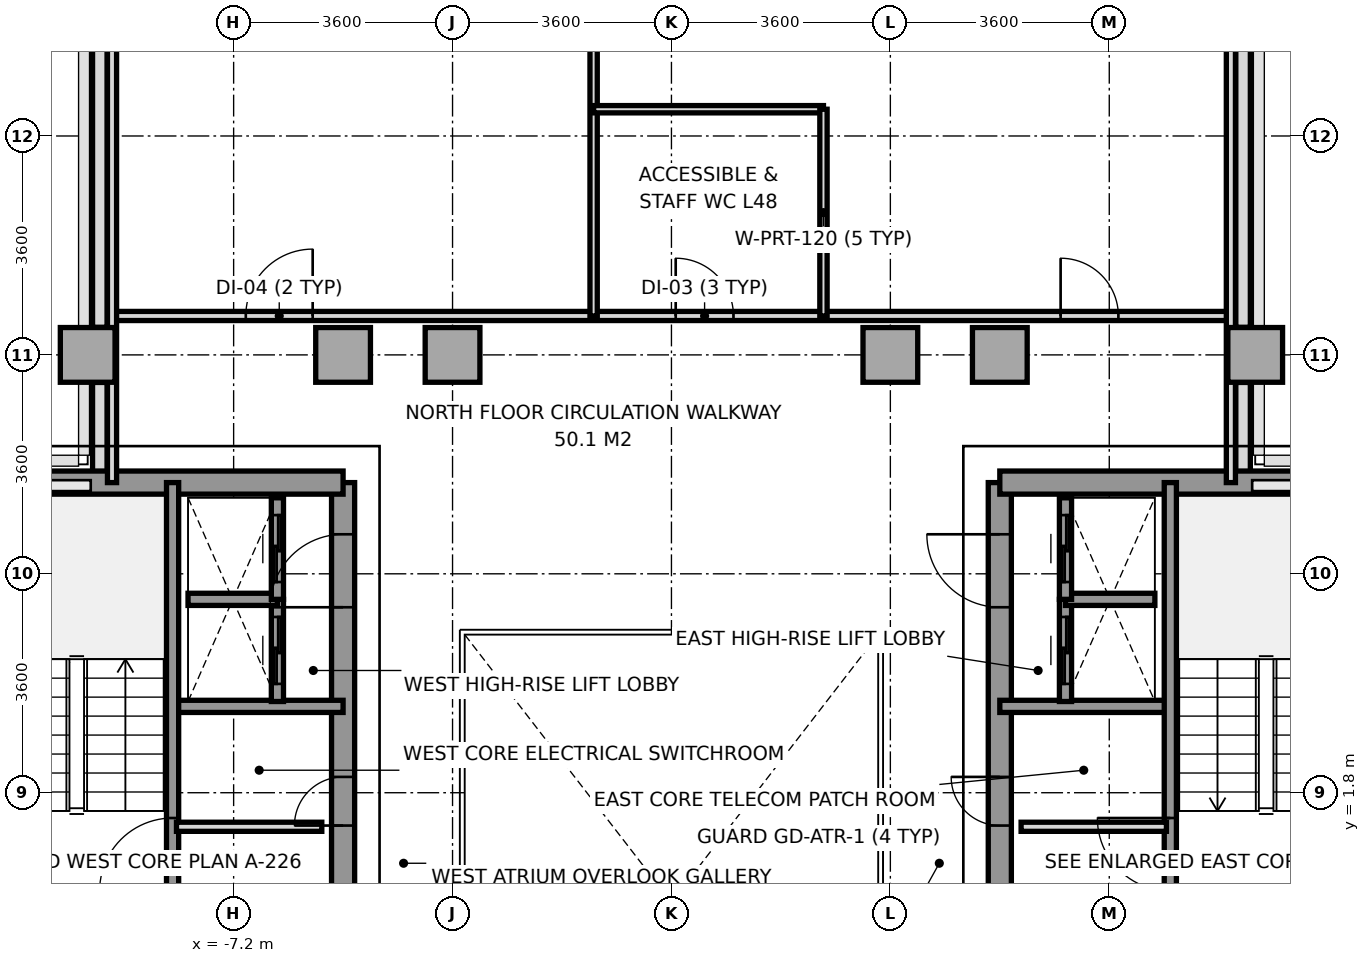
"""IFC4 building model, lengths in metres.
Left out: names, types, materials, properties, quantities, classifications, styles, units other than length and angle.
Written with IfcOpenShell. Run it as: python <this file> out.ifc"""

import sys

from ifc_helpers import new_model, si_unit, direction, frame, frame_2d, origin, origin_2d, place, context, subcontext, project, spatial, rectangle, extrude, source, transform, mapped, element, fill, save


model = new_model("IFC4")
c1 = context("Model", 3, precision=1e-05, world=origin(), true_north=direction((0.0, 1.0)))
c2 = subcontext(c1, "Body", "Model", "MODEL_VIEW")
j1 = project(units=[si_unit("LENGTHUNIT", "METRE"), si_unit("PLANEANGLEUNIT", "RADIAN")], contexts=[c1])
p1 = place(None, origin())
s1 = spatial("IfcSite", under=j1, at=p1, CompositionType="ELEMENT")
p2 = place(p1, origin())
s2 = spatial("IfcBuilding", under=s1, at=p2, CompositionType="ELEMENT")
p3 = place(p2, frame((0.0, 0.0, 177.4)))
s3 = spatial("IfcBuildingStorey", under=s2, at=p3, CompositionType="ELEMENT", Elevation=177.4)
m1 = source(origin(), c2, "Body", "SweptSolid", [
    extrude(rectangle(XDim=0.9, YDim=0.9, at=origin_2d()), origin(), (0.0, 0.0, 1.0), 3.2),
])
for number, where, z_axis, x_axis in (
    (1, (-9.6, 9.0, 0.0), (0.0, 0.0, 1.0), (1.0, 0.0, 0.0)),
    (2, (-5.4, 9.0, 0.0), (0.0, 0.0, 1.0), (1.0, 0.0, 0.0)),
    (3, (-3.6, 9.0, 0.0), (0.0, 0.0, 1.0), (1.0, 0.0, 0.0)),
    (4, (3.6, 9.0, 0.0), (0.0, 0.0, 1.0), (1.0, 0.0, 0.0)),
    (5, (5.4, 9.0, 0.0), (0.0, 0.0, 1.0), (1.0, 0.0, 0.0)),
    (6, (9.6, 9.0, 0.0), (0.0, 0.0, 1.0), (1.0, 0.0, 0.0)),
):
    element("IfcColumn", number, at=place(p3, frame(where, z_axis=z_axis, x_axis=x_axis)), inside=s3, PredefinedType="COLUMN", context=c2, shape_type="MappedRepresentation", body=[
        mapped(m1, transform((0.0, 0.0, 0.0), x_axis=(1.0, 0.0, 0.0), y_axis=(0.0, 1.0, 0.0), z_axis=(0.0, 0.0, 1.0), scale=1.0)),
    ])
p4 = place(p3, frame((-9.4, 6.953, 0.0), z_axis=(0.0, 0.0, 1.0), x_axis=(0.0, 1.0, 0.0)))
e7 = element("IfcWall", 7, at=p4, inside=s3, PredefinedType="PARAPET", context=c2, shape_type="SweptSolid", body=[
    extrude(rectangle(XDim=1.594, YDim=0.24, at=frame_2d((0.797, 0.0))), origin(), (0.0, 0.0, 1.0), 1.15),
])
p5 = place(p3, frame((-9.4, 9.453, 0.0), z_axis=(0.0, 0.0, 1.0), x_axis=(0.0, 1.0, 0.0)))
e8 = element("IfcWall", 8, at=p5, inside=s3, PredefinedType="PARAPET", context=c2, shape_type="SweptSolid", body=[
    extrude(rectangle(XDim=6.15, YDim=0.24, at=frame_2d((3.075, 0.0))), origin(), (0.0, 0.0, 1.0), 1.15),
])
p6 = place(p3, frame((9.4, 15.358, 0.0), z_axis=(0.0, 0.0, 1.0), x_axis=(0.0, -1.0, 0.0)))
e9 = element("IfcWall", 9, at=p6, inside=s3, PredefinedType="PARAPET", context=c2, shape_type="SweptSolid", body=[
    extrude(rectangle(XDim=5.905, YDim=0.24, at=frame_2d((2.952, 0.0))), origin(), (0.0, 0.0, 1.0), 1.15),
])
p7 = place(p3, frame((9.4, 8.547, 0.0), z_axis=(0.0, 0.0, 1.0), x_axis=(0.0, -1.0, 0.0)))
e10 = element("IfcWall", 10, at=p7, inside=s3, PredefinedType="PARAPET", context=c2, shape_type="SweptSolid", body=[
    extrude(rectangle(XDim=1.594, YDim=0.24, at=frame_2d((0.797, 0.0))), origin(), (0.0, 0.0, 1.0), 1.15),
])
p8 = place(p3, frame((-5.4, -5.6, 0.0), z_axis=(0.0, 0.0, 1.0), x_axis=(0.0, 1.0, 0.0)))
e11 = element("IfcWall", 11, at=p8, inside=s3, PredefinedType="SHEAR", context=c2, shape_type="SweptSolid", body=[
    extrude(rectangle(XDim=12.5, YDim=0.38, at=frame_2d((6.25, 0.0))), origin(), (0.0, 0.0, 1.0), 3.2),
])
p9 = place(p8, frame((4.55, 0.0, 0.0)))
e12 = element("IfcOpeningElement", 12, at=p9, cuts=e11, PredefinedType="OPENING", context=c2, shape_type="SweptSolid", body=[
    extrude(rectangle(XDim=1.2, YDim=2.2, at=frame_2d((0.6, 1.1))), frame((0.0, 0.2, 0.0), z_axis=(0.0, -1.0, 0.0), x_axis=(1.0, 0.0, 0.0)), (0.0, 0.0, 1.0), 0.4),
])
p10 = place(p8, frame((10.45, 0.0, 0.0)))
e13 = element("IfcOpeningElement", 13, at=p10, cuts=e11, PredefinedType="OPENING", context=c2, shape_type="SweptSolid", body=[
    extrude(rectangle(XDim=1.2, YDim=2.2, at=frame_2d((0.6, 1.1))), frame((0.0, 0.2, 0.0), z_axis=(0.0, -1.0, 0.0), x_axis=(1.0, 0.0, 0.0)), (0.0, 0.0, 1.0), 0.4),
])
p11 = place(p8, frame((6.86, 0.0, 0.0)))
e14 = element("IfcOpeningElement", 14, at=p11, cuts=e11, PredefinedType="OPENING", context=c2, shape_type="SweptSolid", body=[
    extrude(rectangle(XDim=0.8, YDim=2.1, at=frame_2d((0.4, 1.05))), frame((0.0, 0.2, 0.0), z_axis=(0.0, -1.0, 0.0), x_axis=(1.0, 0.0, 0.0)), (0.0, 0.0, 1.0), 0.4),
])
p12 = place(p3, frame((-11.356, 6.9, 0.0), z_axis=(0.0, 0.0, 1.0), x_axis=(1.0, 0.0, 0.0)))
e15 = element("IfcWall", 15, at=p12, inside=s3, PredefinedType="SHEAR", context=c2, shape_type="SweptSolid", body=[
    extrude(rectangle(XDim=5.956, YDim=0.38, at=frame_2d((2.978, 0.0))), origin(), (0.0, 0.0, 1.0), 3.2),
])
p13 = place(p3, frame((-8.18, 3.22, 0.0), z_axis=(0.0, 0.0, 1.0), x_axis=(1.0, 0.0, 0.0)))
e16 = element("IfcWall", 16, at=p13, inside=s3, PredefinedType="SOLIDWALL", context=c2, shape_type="SweptSolid", body=[
    extrude(rectangle(XDim=2.78, YDim=0.2, at=frame_2d((1.39, 0.0))), origin(), (0.0, 0.0, 1.0), 3.2),
])
p14 = place(p3, frame((-8.204, -0.016, 0.0), z_axis=(0.0, 0.0, 1.0), x_axis=(0.0, 1.0, 0.0)))
e17 = element("IfcWall", 17, at=p14, inside=s3, PredefinedType="SOLIDWALL", context=c2, shape_type="SweptSolid", body=[
    extrude(rectangle(XDim=6.916, YDim=0.2, at=frame_2d((3.458, 0.0))), origin(), (0.0, 0.0, 1.0), 3.2),
])
p15 = place(p14, frame((0.2, 0.0, 0.0)))
e18 = element("IfcOpeningElement", 18, at=p15, cuts=e17, PredefinedType="OPENING", context=c2, shape_type="SweptSolid", body=[
    extrude(rectangle(XDim=1.2, YDim=2.2, at=frame_2d((0.6, 1.1))), frame((0.0, 0.11, 0.0), z_axis=(0.0, -1.0, 0.0), x_axis=(1.0, 0.0, 0.0)), (0.0, 0.0, 1.0), 0.22),
])
p16 = place(p3, frame((5.4, -5.6, 0.0), z_axis=(0.0, 0.0, 1.0), x_axis=(0.0, 1.0, 0.0)))
e19 = element("IfcWall", 19, at=p16, inside=s3, PredefinedType="SHEAR", context=c2, shape_type="SweptSolid", body=[
    extrude(rectangle(XDim=12.5, YDim=0.38, at=frame_2d((6.25, 0.0))), origin(), (0.0, 0.0, 1.0), 3.2),
])
p17 = place(p16, frame((4.55, 0.0, 0.0)))
e20 = element("IfcOpeningElement", 20, at=p17, cuts=e19, PredefinedType="OPENING", context=c2, shape_type="SweptSolid", body=[
    extrude(rectangle(XDim=1.2, YDim=2.2, at=frame_2d((0.6, 1.1))), frame((0.0, 0.2, 0.0), z_axis=(0.0, -1.0, 0.0), x_axis=(1.0, 0.0, 0.0)), (0.0, 0.0, 1.0), 0.4),
])
p18 = place(p16, frame((10.45, 0.0, 0.0)))
e21 = element("IfcOpeningElement", 21, at=p18, cuts=e19, PredefinedType="OPENING", context=c2, shape_type="SweptSolid", body=[
    extrude(rectangle(XDim=1.2, YDim=2.2, at=frame_2d((0.6, 1.1))), frame((0.0, 0.2, 0.0), z_axis=(0.0, -1.0, 0.0), x_axis=(1.0, 0.0, 0.0)), (0.0, 0.0, 1.0), 0.4),
])
p19 = place(p16, frame((6.86, 0.0, 0.0)))
e22 = element("IfcOpeningElement", 22, at=p19, cuts=e19, PredefinedType="OPENING", context=c2, shape_type="SweptSolid", body=[
    extrude(rectangle(XDim=0.8, YDim=2.1, at=frame_2d((0.4, 1.05))), frame((0.0, 0.2, 0.0), z_axis=(0.0, -1.0, 0.0), x_axis=(1.0, 0.0, 0.0)), (0.0, 0.0, 1.0), 0.4),
])
p20 = place(p3, frame((5.4, 6.9, 0.0), z_axis=(0.0, 0.0, 1.0), x_axis=(1.0, 0.0, 0.0)))
e23 = element("IfcWall", 23, at=p20, inside=s3, PredefinedType="SHEAR", context=c2, shape_type="SweptSolid", body=[
    extrude(rectangle(XDim=5.956, YDim=0.38, at=frame_2d((2.978, 0.0))), origin(), (0.0, 0.0, 1.0), 3.2),
])
p21 = place(p3, frame((5.4, 3.22, 0.0), z_axis=(0.0, 0.0, 1.0), x_axis=(1.0, 0.0, 0.0)))
e24 = element("IfcWall", 24, at=p21, inside=s3, PredefinedType="SOLIDWALL", context=c2, shape_type="SweptSolid", body=[
    extrude(rectangle(XDim=2.78, YDim=0.2, at=frame_2d((1.39, 0.0))), origin(), (0.0, 0.0, 1.0), 3.2),
])
p22 = place(p3, frame((8.204, -0.016, 0.0), z_axis=(0.0, 0.0, 1.0), x_axis=(0.0, 1.0, 0.0)))
e25 = element("IfcWall", 25, at=p22, inside=s3, PredefinedType="SOLIDWALL", context=c2, shape_type="SweptSolid", body=[
    extrude(rectangle(XDim=6.916, YDim=0.2, at=frame_2d((3.458, 0.0))), origin(), (0.0, 0.0, 1.0), 3.2),
])
p23 = place(p22, frame((0.2, 0.0, 0.0)))
e26 = element("IfcOpeningElement", 26, at=p23, cuts=e25, PredefinedType="OPENING", context=c2, shape_type="SweptSolid", body=[
    extrude(rectangle(XDim=1.2, YDim=2.2, at=frame_2d((0.6, 1.1))), frame((0.0, 0.11, 0.0), z_axis=(0.0, -1.0, 0.0), x_axis=(1.0, 0.0, 0.0)), (0.0, 0.0, 1.0), 0.22),
])
p24 = place(p3, frame((-6.48, 3.3, 0.0), z_axis=(0.0, 0.0, 1.0), x_axis=(0.0, 1.0, 0.0)))
e27 = element("IfcWall", 27, at=p24, inside=s3, PredefinedType="SOLIDWALL", context=c2, shape_type="SweptSolid", body=[
    extrude(rectangle(XDim=1.68, YDim=0.2, at=frame_2d((0.84, 0.0))), origin(), (0.0, 0.0, 1.0), 3.2),
])
p25 = place(p24, frame((0.29, 0.0, 0.0)))
e28 = element("IfcOpeningElement", 28, at=p25, cuts=e27, PredefinedType="OPENING", context=c2, shape_type="SweptSolid", body=[
    extrude(rectangle(XDim=1.1, YDim=2.2, at=frame_2d((0.55, 1.1))), frame((0.0, 0.11, 0.0), z_axis=(0.0, -1.0, 0.0), x_axis=(1.0, 0.0, 0.0)), (0.0, 0.0, 1.0), 0.22),
])
p26 = place(p3, frame((-7.95, 4.98, 0.0), z_axis=(0.0, 0.0, 1.0), x_axis=(1.0, 0.0, 0.0)))
e29 = element("IfcWall", 29, at=p26, inside=s3, PredefinedType="SOLIDWALL", context=c2, shape_type="SweptSolid", body=[
    extrude(rectangle(XDim=1.47, YDim=0.2, at=frame_2d((0.735, 0.0))), origin(), (0.0, 0.0, 1.0), 3.2),
])
p27 = place(p3, frame((-6.48, 4.98, 0.0), z_axis=(0.0, 0.0, 1.0), x_axis=(0.0, 1.0, 0.0)))
e30 = element("IfcWall", 30, at=p27, inside=s3, PredefinedType="SOLIDWALL", context=c2, shape_type="SweptSolid", body=[
    extrude(rectangle(XDim=1.67, YDim=0.2, at=frame_2d((0.835, 0.0))), origin(), (0.0, 0.0, 1.0), 3.2),
])
p28 = place(p27, frame((0.285, 0.0, 0.0)))
e31 = element("IfcOpeningElement", 31, at=p28, cuts=e30, PredefinedType="OPENING", context=c2, shape_type="SweptSolid", body=[
    extrude(rectangle(XDim=1.1, YDim=2.2, at=frame_2d((0.55, 1.1))), frame((0.0, 0.11, 0.0), z_axis=(0.0, -1.0, 0.0), x_axis=(1.0, 0.0, 0.0)), (0.0, 0.0, 1.0), 0.22),
])
p29 = place(p3, frame((6.48, 3.3, 0.0), z_axis=(0.0, 0.0, 1.0), x_axis=(0.0, 1.0, 0.0)))
e32 = element("IfcWall", 32, at=p29, inside=s3, PredefinedType="SOLIDWALL", context=c2, shape_type="SweptSolid", body=[
    extrude(rectangle(XDim=1.68, YDim=0.2, at=frame_2d((0.84, 0.0))), origin(), (0.0, 0.0, 1.0), 3.2),
])
p30 = place(p29, frame((0.29, 0.0, 0.0)))
e33 = element("IfcOpeningElement", 33, at=p30, cuts=e32, PredefinedType="OPENING", context=c2, shape_type="SweptSolid", body=[
    extrude(rectangle(XDim=1.1, YDim=2.2, at=frame_2d((0.55, 1.1))), frame((0.0, 0.11, 0.0), z_axis=(0.0, -1.0, 0.0), x_axis=(1.0, 0.0, 0.0)), (0.0, 0.0, 1.0), 0.22),
])
p31 = place(p3, frame((6.48, 4.98, 0.0), z_axis=(0.0, 0.0, 1.0), x_axis=(1.0, 0.0, 0.0)))
e34 = element("IfcWall", 34, at=p31, inside=s3, PredefinedType="SOLIDWALL", context=c2, shape_type="SweptSolid", body=[
    extrude(rectangle(XDim=1.47, YDim=0.2, at=frame_2d((0.735, 0.0))), origin(), (0.0, 0.0, 1.0), 3.2),
])
p32 = place(p3, frame((6.48, 4.98, 0.0), z_axis=(0.0, 0.0, 1.0), x_axis=(0.0, 1.0, 0.0)))
e35 = element("IfcWall", 35, at=p32, inside=s3, PredefinedType="SOLIDWALL", context=c2, shape_type="SweptSolid", body=[
    extrude(rectangle(XDim=1.67, YDim=0.2, at=frame_2d((0.835, 0.0))), origin(), (0.0, 0.0, 1.0), 3.2),
])
p33 = place(p32, frame((0.285, 0.0, 0.0)))
e36 = element("IfcOpeningElement", 36, at=p33, cuts=e35, PredefinedType="OPENING", context=c2, shape_type="SweptSolid", body=[
    extrude(rectangle(XDim=1.1, YDim=2.2, at=frame_2d((0.55, 1.1))), frame((0.0, 0.11, 0.0), z_axis=(0.0, -1.0, 0.0), x_axis=(1.0, 0.0, 0.0)), (0.0, 0.0, 1.0), 0.22),
])
for number, where, z_axis, x_axis in (
    (37, (-8.14, 1.24, 0.0), (0.0, 0.0, 1.0), (1.0, 0.0, 0.0)),
    (38, (5.75, 1.24, 0.0), (0.0, 0.0, 1.0), (1.0, 0.0, 0.0)),
):
    element("IfcWall", number, at=place(p3, frame(where, z_axis=z_axis, x_axis=x_axis)), inside=s3, PredefinedType="PARTITIONING", context=c2, shape_type="SweptSolid", body=[
        extrude(rectangle(XDim=2.39, YDim=0.15, at=frame_2d((1.195, 0.0))), origin(), (0.0, 0.0, 1.0), 2.3),
    ])
p34 = place(p3, frame((-9.2, 9.64, 0.0), z_axis=(0.0, 0.0, 1.0), x_axis=(1.0, 0.0, 0.0)))
e39 = element("IfcWall", 39, at=p34, inside=s3, PredefinedType="PARTITIONING", context=c2, shape_type="SweptSolid", body=[
    extrude(rectangle(XDim=18.4, YDim=0.15, at=frame_2d((9.2, 0.0))), origin(), (0.0, 0.0, 1.0), 3.2),
])
p35 = place(p34, frame((9.27, 0.0, 0.0)))
e40 = element("IfcOpeningElement", 40, at=p35, cuts=e39, PredefinedType="OPENING", context=c2, shape_type="SweptSolid", body=[
    extrude(rectangle(XDim=0.95, YDim=2.15, at=frame_2d((0.475, 1.075))), frame((0.0, 0.085, 0.0), z_axis=(0.0, -1.0, 0.0), x_axis=(1.0, 0.0, 0.0)), (0.0, 0.0, 1.0), 0.17),
])
p36 = place(p34, frame((2.2, 0.0, 0.0)))
e41 = element("IfcOpeningElement", 41, at=p36, cuts=e39, PredefinedType="OPENING", context=c2, shape_type="SweptSolid", body=[
    extrude(rectangle(XDim=1.1, YDim=2.2, at=frame_2d((0.55, 1.1))), frame((0.0, 0.085, 0.0), z_axis=(0.0, -1.0, 0.0), x_axis=(1.0, 0.0, 0.0)), (0.0, 0.0, 1.0), 0.17),
])
p37 = place(p34, frame((15.6, 0.0, 0.0)))
e42 = element("IfcOpeningElement", 42, at=p37, cuts=e39, PredefinedType="OPENING", context=c2, shape_type="SweptSolid", body=[
    extrude(rectangle(XDim=0.95, YDim=2.15, at=frame_2d((0.475, 1.075))), frame((0.0, 0.085, 0.0), z_axis=(0.0, -1.0, 0.0), x_axis=(1.0, 0.0, 0.0)), (0.0, 0.0, 1.0), 0.17),
])
for number, where, z_axis, x_axis in (
    (43, (-9.2, 6.9, 0.0), (0.0, 0.0, 1.0), (0.0, 1.0, 0.0)),
    (44, (9.2, 6.9, 0.0), (0.0, 0.0, 1.0), (0.0, 1.0, 0.0)),
):
    element("IfcWall", number, at=place(p3, frame(where, z_axis=z_axis, x_axis=x_axis)), inside=s3, PredefinedType="PARTITIONING", context=c2, shape_type="SweptSolid", body=[
        extrude(rectangle(XDim=8.78, YDim=0.15, at=frame_2d((4.39, 0.0))), origin(), (0.0, 0.0, 1.0), 2.75),
    ])
p38 = place(p3, frame((-1.28, 9.64, 0.0), z_axis=(0.0, 0.0, 1.0), x_axis=(0.0, 1.0, 0.0)))
e45 = element("IfcWall", 45, at=p38, inside=s3, PredefinedType="PARTITIONING", context=c2, shape_type="SweptSolid", body=[
    extrude(rectangle(XDim=15.01, YDim=0.12, at=frame_2d((7.505, 0.0))), origin(), (0.0, 0.0, 1.0), 2.75),
])
p39 = place(p3, frame((-1.28, 13.04, 0.0), z_axis=(0.0, 0.0, 1.0), x_axis=(1.0, 0.0, 0.0)))
e46 = element("IfcWall", 46, at=p39, inside=s3, PredefinedType="PARTITIONING", context=c2, shape_type="SweptSolid", body=[
    extrude(rectangle(XDim=3.78, YDim=0.12, at=frame_2d((1.89, 0.0))), origin(), (0.0, 0.0, 1.0), 3.2),
])
p40 = place(p3, frame((2.5, 9.64, 0.0), z_axis=(0.0, 0.0, 1.0), x_axis=(0.0, 1.0, 0.0)))
e47 = element("IfcWall", 47, at=p40, inside=s3, PredefinedType="PARTITIONING", context=c2, shape_type="SweptSolid", body=[
    extrude(rectangle(XDim=3.4, YDim=0.12, at=frame_2d((1.7, 0.0))), origin(), (0.0, 0.0, 1.0), 3.2),
])
m2 = source(origin(), c2, "Body", "SweptSolid", [
    extrude(rectangle(XDim=1.2, YDim=2.2, at=frame_2d((0.6, 1.1))), frame((0.0, 0.025, 0.0), z_axis=(0.0, -1.0, 0.0), x_axis=(1.0, 0.0, 0.0)), (0.0, 0.0, 1.0), 0.05),
])
p41 = place(p15, origin())
e48 = element("IfcDoor", 48, at=p41, inside=s3, OperationType="SINGLE_SWING_LEFT", PredefinedType="DOOR", context=c2, shape_type="MappedRepresentation", body=[
    mapped(m2, transform((0.0, 0.0, 0.0), x_axis=(1.0, 0.0, 0.0), y_axis=(0.0, 1.0, 0.0), z_axis=(0.0, 0.0, 1.0), scale=1.0)),
])
fill(e18, e48)
p42 = place(p10, origin())
e49 = element("IfcDoor", 49, at=p42, inside=s3, OperationType="SINGLE_SWING_LEFT", PredefinedType="DOOR", context=c2, shape_type="MappedRepresentation", body=[
    mapped(m2, transform((0.0, 0.0, 0.0), x_axis=(1.0, 0.0, 0.0), y_axis=(0.0, 1.0, 0.0), z_axis=(0.0, 0.0, 1.0), scale=1.0)),
])
fill(e13, e49)
p43 = place(p23, origin())
e50 = element("IfcDoor", 50, at=p43, inside=s3, OperationType="SINGLE_SWING_RIGHT", PredefinedType="DOOR", context=c2, shape_type="MappedRepresentation", body=[
    mapped(m2, transform((0.0, 0.0, 0.0), x_axis=(1.0, 0.0, 0.0), y_axis=(0.0, 1.0, 0.0), z_axis=(0.0, 0.0, 1.0), scale=1.0)),
])
fill(e26, e50)
p44 = place(p18, origin())
e51 = element("IfcDoor", 51, at=p44, inside=s3, OperationType="SINGLE_SWING_RIGHT", PredefinedType="DOOR", context=c2, shape_type="MappedRepresentation", body=[
    mapped(m2, transform((0.0, 0.0, 0.0), x_axis=(1.0, 0.0, 0.0), y_axis=(0.0, 1.0, 0.0), z_axis=(0.0, 0.0, 1.0), scale=1.0)),
])
fill(e21, e51)
m3 = source(origin(), c2, "Body", "SweptSolid", [
    extrude(rectangle(XDim=0.8, YDim=2.1, at=frame_2d((0.4, 1.05))), frame((0.0, 0.025, 0.0), z_axis=(0.0, -1.0, 0.0), x_axis=(1.0, 0.0, 0.0)), (0.0, 0.0, 1.0), 0.05),
])
p45 = place(p11, origin())
e52 = element("IfcDoor", 52, at=p45, inside=s3, OperationType="SINGLE_SWING_LEFT", PredefinedType="DOOR", context=c2, shape_type="MappedRepresentation", body=[
    mapped(m3, transform((0.0, 0.0, 0.0), x_axis=(1.0, 0.0, 0.0), y_axis=(0.0, 1.0, 0.0), z_axis=(0.0, 0.0, 1.0), scale=1.0)),
])
fill(e14, e52)
p46 = place(p19, origin())
e53 = element("IfcDoor", 53, at=p46, inside=s3, OperationType="SINGLE_SWING_RIGHT", PredefinedType="DOOR", context=c2, shape_type="MappedRepresentation", body=[
    mapped(m3, transform((0.0, 0.0, 0.0), x_axis=(1.0, 0.0, 0.0), y_axis=(0.0, 1.0, 0.0), z_axis=(0.0, 0.0, 1.0), scale=1.0)),
])
fill(e22, e53)
m4 = source(origin(), c2, "Body", "SweptSolid", [
    extrude(rectangle(XDim=1.1, YDim=2.2, at=frame_2d((0.55, 1.1))), frame((0.0, 0.025, 0.0), z_axis=(0.0, -1.0, 0.0), x_axis=(1.0, 0.0, 0.0)), (0.0, 0.0, 1.0), 0.05),
])
p47 = place(p25, origin())
e54 = element("IfcDoor", 54, at=p47, inside=s3, OperationType="SLIDING_TO_LEFT", PredefinedType="DOOR", context=c2, shape_type="MappedRepresentation", body=[
    mapped(m4, transform((0.0, 0.0, 0.0), x_axis=(1.0, 0.0, 0.0), y_axis=(0.0, 1.0, 0.0), z_axis=(0.0, 0.0, 1.0), scale=1.0)),
])
fill(e28, e54)
p48 = place(p28, origin())
e55 = element("IfcDoor", 55, at=p48, inside=s3, OperationType="SLIDING_TO_LEFT", PredefinedType="DOOR", context=c2, shape_type="MappedRepresentation", body=[
    mapped(m4, transform((0.0, 0.0, 0.0), x_axis=(1.0, 0.0, 0.0), y_axis=(0.0, 1.0, 0.0), z_axis=(0.0, 0.0, 1.0), scale=1.0)),
])
fill(e31, e55)
p49 = place(p30, origin())
e56 = element("IfcDoor", 56, at=p49, inside=s3, OperationType="SLIDING_TO_LEFT", PredefinedType="DOOR", context=c2, shape_type="MappedRepresentation", body=[
    mapped(m4, transform((0.0, 0.0, 0.0), x_axis=(1.0, 0.0, 0.0), y_axis=(0.0, 1.0, 0.0), z_axis=(0.0, 0.0, 1.0), scale=1.0)),
])
fill(e33, e56)
p50 = place(p33, origin())
e57 = element("IfcDoor", 57, at=p50, inside=s3, OperationType="SLIDING_TO_LEFT", PredefinedType="DOOR", context=c2, shape_type="MappedRepresentation", body=[
    mapped(m4, transform((0.0, 0.0, 0.0), x_axis=(1.0, 0.0, 0.0), y_axis=(0.0, 1.0, 0.0), z_axis=(0.0, 0.0, 1.0), scale=1.0)),
])
fill(e36, e57)
m5 = source(origin(), c2, "Body", "SweptSolid", [
    extrude(rectangle(XDim=0.95, YDim=2.15, at=frame_2d((0.475, 1.075))), frame((0.0, 0.025, 0.0), z_axis=(0.0, -1.0, 0.0), x_axis=(1.0, 0.0, 0.0)), (0.0, 0.0, 1.0), 0.05),
])
p51 = place(p35, origin())
e58 = element("IfcDoor", 58, at=p51, inside=s3, OperationType="SINGLE_SWING_LEFT", PredefinedType="DOOR", context=c2, shape_type="MappedRepresentation", body=[
    mapped(m5, transform((0.0, 0.0, 0.0), x_axis=(1.0, 0.0, 0.0), y_axis=(0.0, 1.0, 0.0), z_axis=(0.0, 0.0, 1.0), scale=1.0)),
])
fill(e40, e58)
p52 = place(p36, origin())
e59 = element("IfcDoor", 59, at=p52, inside=s3, OperationType="SINGLE_SWING_RIGHT", PredefinedType="DOOR", context=c2, shape_type="MappedRepresentation", body=[
    mapped(m4, transform((0.0, 0.0, 0.0), x_axis=(1.0, 0.0, 0.0), y_axis=(0.0, 1.0, 0.0), z_axis=(0.0, 0.0, 1.0), scale=1.0)),
])
fill(e41, e59)
p53 = place(p37, origin())
e60 = element("IfcDoor", 60, at=p53, inside=s3, OperationType="SINGLE_SWING_LEFT", PredefinedType="DOOR", context=c2, shape_type="MappedRepresentation", body=[
    mapped(m5, transform((0.0, 0.0, 0.0), x_axis=(1.0, 0.0, 0.0), y_axis=(0.0, 1.0, 0.0), z_axis=(0.0, 0.0, 1.0), scale=1.0)),
])
fill(e42, e60)
save(model, sys.argv[1])
